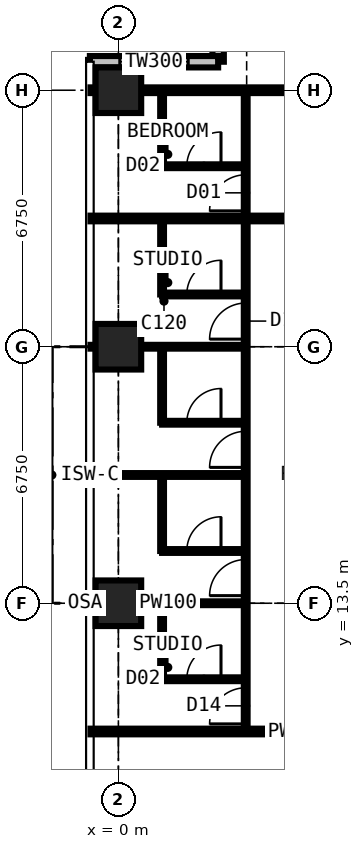
"""IFC4 building model, lengths in metres.
Left out: names, types, materials, properties, quantities, classifications, styles, units other than length and angle.
Written with IfcOpenShell. Run it as: python <this file> out.ifc"""

import sys

from ifc_helpers import new_model, si_unit, direction, frame, frame_2d, origin, origin_2d, place, context, subcontext, project, spatial, rectangle, extrude, element, fill, save


model = new_model("IFC4")
c1 = context("Model", 3, precision=1e-05, world=origin(), true_north=direction((0.0, 1.0)))
c2 = subcontext(c1, "Body", "Model", "MODEL_VIEW")
j1 = project(units=[si_unit("LENGTHUNIT", "METRE"), si_unit("PLANEANGLEUNIT", "RADIAN")], contexts=[c1])
p1 = place(None, origin())
s1 = spatial("IfcSite", under=j1, at=p1, CompositionType="ELEMENT")
p2 = place(p1, origin())
s2 = spatial("IfcBuilding", under=s1, at=p2, CompositionType="ELEMENT")
p3 = place(p2, frame((0.0, 0.0, 181.8)))
s3 = spatial("IfcBuildingStorey", under=s2, at=p3, CompositionType="ELEMENT", Elevation=181.8)
for number, where, z_axis, x_axis in (
    (1, (0.0, 13.5, 0.0), (0.0, 0.0, 1.0), (1.0, 0.0, 0.0)),
    (2, (0.0, 20.25, 0.0), (0.0, 0.0, 1.0), (1.0, 0.0, 0.0)),
    (3, (0.0, 27.0, 0.0), (0.0, 0.0, 1.0), (1.0, 0.0, 0.0)),
):
    element("IfcColumn", number, at=place(p3, frame(where, z_axis=z_axis, x_axis=x_axis)), inside=s3, PredefinedType="COLUMN", context=c2, shape_type="SweptSolid", body=[
        extrude(rectangle(XDim=1.2, YDim=1.2, at=origin_2d()), origin(), (0.0, 0.0, 1.0), 3.6),
    ])
p4 = place(p3, frame((2.625, 31.125, 0.0), z_axis=(0.0, 0.0, 1.0), x_axis=(0.0, -1.0, 0.0)))
e4 = element("IfcWall", 4, at=p4, inside=s3, PredefinedType="SOLIDWALL", context=c2, shape_type="SweptSolid", body=[
    extrude(rectangle(XDim=3.375, YDim=0.3, at=frame_2d((1.688, 0.0))), origin(), (0.0, 0.0, 1.0), 3.375),
])
p5 = place(p4, frame((0.788, 0.0, 0.6)))
e5 = element("IfcOpeningElement", 5, at=p5, cuts=e4, PredefinedType="OPENING", context=c2, shape_type="SweptSolid", body=[
    extrude(rectangle(XDim=1.8, YDim=2.1, at=frame_2d((0.9, 1.05))), frame((0.0, 0.16, 0.0), z_axis=(0.0, -1.0, 0.0), x_axis=(1.0, 0.0, 0.0)), (0.0, 0.0, 1.0), 0.32),
])
p6 = place(p3, frame((2.625, 27.75, 0.0), z_axis=(0.0, 0.0, 1.0), x_axis=(-1.0, 0.0, 0.0)))
e6 = element("IfcWall", 6, at=p6, inside=s3, PredefinedType="SOLIDWALL", context=c2, shape_type="SweptSolid", body=[
    extrude(rectangle(XDim=3.375, YDim=0.3, at=frame_2d((1.688, 0.0))), origin(), (0.0, 0.0, 1.0), 3.375),
])
p7 = place(p6, frame((0.788, 0.0, 0.6)))
e7 = element("IfcOpeningElement", 7, at=p7, cuts=e6, PredefinedType="OPENING", context=c2, shape_type="SweptSolid", body=[
    extrude(rectangle(XDim=1.8, YDim=2.1, at=frame_2d((0.9, 1.05))), frame((0.0, 0.16, 0.0), z_axis=(0.0, -1.0, 0.0), x_axis=(1.0, 0.0, 0.0)), (0.0, 0.0, 1.0), 0.32),
])
p8 = place(p3, frame((-0.734, 10.125, 0.0), z_axis=(0.0, 0.0, 1.0), x_axis=(1.0, 0.0, 0.0)))
e8 = element("IfcWall", 8, at=p8, inside=s3, PredefinedType="PARTITIONING", context=c2, shape_type="SweptSolid", body=[
    extrude(rectangle(XDim=10.859, YDim=0.15, at=frame_2d((5.429, 0.0))), origin(), (0.0, 0.0, 1.0), 3.375),
])
p9 = place(p8, frame((8.234, 0.0, 0.0)))
e9 = element("IfcOpeningElement", 9, at=p9, cuts=e8, PredefinedType="OPENING", context=c2, shape_type="SweptSolid", body=[
    extrude(rectangle(XDim=0.95, YDim=2.2, at=frame_2d((0.475, 1.1))), frame((0.0, 0.085, 0.0), z_axis=(0.0, -1.0, 0.0), x_axis=(1.0, 0.0, 0.0)), (0.0, 0.0, 1.0), 0.17),
])
p10 = place(p3, frame((-0.734, 13.5, 0.0), z_axis=(0.0, 0.0, 1.0), x_axis=(1.0, 0.0, 0.0)))
e10 = element("IfcWall", 10, at=p10, inside=s3, PredefinedType="PARTITIONING", context=c2, shape_type="SweptSolid", body=[
    extrude(rectangle(XDim=4.084, YDim=0.1, at=frame_2d((2.042, 0.0))), origin(), (0.0, 0.0, 1.0), 2.61),
])
p11 = place(p3, frame((-0.734, 16.875, 0.0), z_axis=(0.0, 0.0, 1.0), x_axis=(1.0, 0.0, 0.0)))
e11 = element("IfcWall", 11, at=p11, inside=s3, PredefinedType="PARTITIONING", context=c2, shape_type="SweptSolid", body=[
    extrude(rectangle(XDim=4.084, YDim=0.1, at=frame_2d((2.042, 0.0))), origin(), (0.0, 0.0, 1.0), 3.375),
])
p12 = place(p3, frame((-0.734, 20.25, 0.0), z_axis=(0.0, 0.0, 1.0), x_axis=(1.0, 0.0, 0.0)))
e12 = element("IfcWall", 12, at=p12, inside=s3, PredefinedType="PARTITIONING", context=c2, shape_type="SweptSolid", body=[
    extrude(rectangle(XDim=4.084, YDim=0.1, at=frame_2d((2.042, 0.0))), origin(), (0.0, 0.0, 1.0), 2.61),
])
p13 = place(p3, frame((-0.734, 23.625, 0.0), z_axis=(0.0, 0.0, 1.0), x_axis=(1.0, 0.0, 0.0)))
e13 = element("IfcWall", 13, at=p13, inside=s3, PredefinedType="PARTITIONING", context=c2, shape_type="SweptSolid", body=[
    extrude(rectangle(XDim=12.034, YDim=0.15, at=frame_2d((6.017, 0.0))), origin(), (0.0, 0.0, 1.0), 3.375),
])
p14 = place(p3, frame((-0.734, 27.0, 0.0), z_axis=(0.0, 0.0, 1.0), x_axis=(1.0, 0.0, 0.0)))
e14 = element("IfcWall", 14, at=p14, inside=s3, PredefinedType="PARTITIONING", context=c2, shape_type="SweptSolid", body=[
    extrude(rectangle(XDim=12.034, YDim=0.15, at=frame_2d((6.017, 0.0))), origin(), (0.0, 0.0, 1.0), 2.806),
])
p15 = place(p14, frame((8.134, 0.0, 0.0)))
e15 = element("IfcOpeningElement", 15, at=p15, cuts=e14, PredefinedType="OPENING", context=c2, shape_type="SweptSolid", body=[
    extrude(rectangle(XDim=1.0, YDim=2.2, at=frame_2d((0.5, 1.1))), frame((0.0, 0.085, 0.0), z_axis=(0.0, -1.0, 0.0), x_axis=(1.0, 0.0, 0.0)), (0.0, 0.0, 1.0), 0.17),
])
p16 = place(p3, frame((1.15, 11.5, 0.0), z_axis=(0.0, 0.0, 1.0), x_axis=(0.0, 1.0, 0.0)))
e16 = element("IfcWall", 16, at=p16, inside=s3, PredefinedType="PARTITIONING", context=c2, shape_type="SweptSolid", body=[
    extrude(rectangle(XDim=2.0, YDim=0.1, at=frame_2d((1.0, 0.0))), origin(), (0.0, 0.0, 1.0), 3.375),
])
p17 = place(p3, frame((1.15, 11.5, 0.0), z_axis=(0.0, 0.0, 1.0), x_axis=(1.0, 0.0, 0.0)))
e17 = element("IfcWall", 17, at=p17, inside=s3, PredefinedType="PARTITIONING", context=c2, shape_type="SweptSolid", body=[
    extrude(rectangle(XDim=2.2, YDim=0.1, at=frame_2d((1.1, 0.0))), origin(), (0.0, 0.0, 1.0), 3.375),
])
p18 = place(p17, frame((0.65, 0.0, 0.0)))
e18 = element("IfcOpeningElement", 18, at=p18, cuts=e17, PredefinedType="OPENING", context=c2, shape_type="SweptSolid", body=[
    extrude(rectangle(XDim=0.9, YDim=2.2, at=frame_2d((0.45, 1.1))), frame((0.0, 0.06, 0.0), z_axis=(0.0, -1.0, 0.0), x_axis=(1.0, 0.0, 0.0)), (0.0, 0.0, 1.0), 0.12),
])
p19 = place(p3, frame((1.15, 14.875, 0.0), z_axis=(0.0, 0.0, 1.0), x_axis=(0.0, 1.0, 0.0)))
e19 = element("IfcWall", 19, at=p19, inside=s3, PredefinedType="PARTITIONING", context=c2, shape_type="SweptSolid", body=[
    extrude(rectangle(XDim=2.0, YDim=0.1, at=frame_2d((1.0, 0.0))), origin(), (0.0, 0.0, 1.0), 3.375),
])
p20 = place(p3, frame((1.15, 14.875, 0.0), z_axis=(0.0, 0.0, 1.0), x_axis=(1.0, 0.0, 0.0)))
e20 = element("IfcWall", 20, at=p20, inside=s3, PredefinedType="PARTITIONING", context=c2, shape_type="SweptSolid", body=[
    extrude(rectangle(XDim=2.2, YDim=0.1, at=frame_2d((1.1, 0.0))), origin(), (0.0, 0.0, 1.0), 3.375),
])
p21 = place(p20, frame((0.65, 0.0, 0.0)))
e21 = element("IfcOpeningElement", 21, at=p21, cuts=e20, PredefinedType="OPENING", context=c2, shape_type="SweptSolid", body=[
    extrude(rectangle(XDim=0.9, YDim=2.2, at=frame_2d((0.45, 1.1))), frame((0.0, 0.06, 0.0), z_axis=(0.0, -1.0, 0.0), x_axis=(1.0, 0.0, 0.0)), (0.0, 0.0, 1.0), 0.12),
])
p22 = place(p3, frame((1.15, 18.25, 0.0), z_axis=(0.0, 0.0, 1.0), x_axis=(0.0, 1.0, 0.0)))
e22 = element("IfcWall", 22, at=p22, inside=s3, PredefinedType="PARTITIONING", context=c2, shape_type="SweptSolid", body=[
    extrude(rectangle(XDim=2.0, YDim=0.1, at=frame_2d((1.0, 0.0))), origin(), (0.0, 0.0, 1.0), 3.375),
])
p23 = place(p3, frame((1.15, 18.25, 0.0), z_axis=(0.0, 0.0, 1.0), x_axis=(1.0, 0.0, 0.0)))
e23 = element("IfcWall", 23, at=p23, inside=s3, PredefinedType="PARTITIONING", context=c2, shape_type="SweptSolid", body=[
    extrude(rectangle(XDim=2.2, YDim=0.1, at=frame_2d((1.1, 0.0))), origin(), (0.0, 0.0, 1.0), 3.375),
])
p24 = place(p23, frame((0.65, 0.0, 0.0)))
e24 = element("IfcOpeningElement", 24, at=p24, cuts=e23, PredefinedType="OPENING", context=c2, shape_type="SweptSolid", body=[
    extrude(rectangle(XDim=0.9, YDim=2.2, at=frame_2d((0.45, 1.1))), frame((0.0, 0.06, 0.0), z_axis=(0.0, -1.0, 0.0), x_axis=(1.0, 0.0, 0.0)), (0.0, 0.0, 1.0), 0.12),
])
p25 = place(p3, frame((1.15, 21.625, 0.0), z_axis=(0.0, 0.0, 1.0), x_axis=(0.0, 1.0, 0.0)))
e25 = element("IfcWall", 25, at=p25, inside=s3, PredefinedType="PARTITIONING", context=c2, shape_type="SweptSolid", body=[
    extrude(rectangle(XDim=2.0, YDim=0.1, at=frame_2d((1.0, 0.0))), origin(), (0.0, 0.0, 1.0), 3.375),
])
p26 = place(p3, frame((1.15, 21.625, 0.0), z_axis=(0.0, 0.0, 1.0), x_axis=(1.0, 0.0, 0.0)))
e26 = element("IfcWall", 26, at=p26, inside=s3, PredefinedType="PARTITIONING", context=c2, shape_type="SweptSolid", body=[
    extrude(rectangle(XDim=2.2, YDim=0.1, at=frame_2d((1.1, 0.0))), origin(), (0.0, 0.0, 1.0), 3.375),
])
p27 = place(p26, frame((0.65, 0.0, 0.0)))
e27 = element("IfcOpeningElement", 27, at=p27, cuts=e26, PredefinedType="OPENING", context=c2, shape_type="SweptSolid", body=[
    extrude(rectangle(XDim=0.9, YDim=2.2, at=frame_2d((0.45, 1.1))), frame((0.0, 0.06, 0.0), z_axis=(0.0, -1.0, 0.0), x_axis=(1.0, 0.0, 0.0)), (0.0, 0.0, 1.0), 0.12),
])
p28 = place(p3, frame((1.15, 25.0, 0.0), z_axis=(0.0, 0.0, 1.0), x_axis=(0.0, 1.0, 0.0)))
e28 = element("IfcWall", 28, at=p28, inside=s3, PredefinedType="PARTITIONING", context=c2, shape_type="SweptSolid", body=[
    extrude(rectangle(XDim=2.0, YDim=0.1, at=frame_2d((1.0, 0.0))), origin(), (0.0, 0.0, 1.0), 3.375),
])
p29 = place(p3, frame((1.15, 25.0, 0.0), z_axis=(0.0, 0.0, 1.0), x_axis=(1.0, 0.0, 0.0)))
e29 = element("IfcWall", 29, at=p29, inside=s3, PredefinedType="PARTITIONING", context=c2, shape_type="SweptSolid", body=[
    extrude(rectangle(XDim=2.2, YDim=0.1, at=frame_2d((1.1, 0.0))), origin(), (0.0, 0.0, 1.0), 3.375),
])
p30 = place(p29, frame((0.65, 0.0, 0.0)))
e30 = element("IfcOpeningElement", 30, at=p30, cuts=e29, PredefinedType="OPENING", context=c2, shape_type="SweptSolid", body=[
    extrude(rectangle(XDim=0.9, YDim=2.2, at=frame_2d((0.45, 1.1))), frame((0.0, 0.06, 0.0), z_axis=(0.0, -1.0, 0.0), x_axis=(1.0, 0.0, 0.0)), (0.0, 0.0, 1.0), 0.12),
])
p31 = place(p3, frame((3.35, 10.125, 0.0), z_axis=(0.0, 0.0, 1.0), x_axis=(0.0, 1.0, 0.0)))
e31 = element("IfcWall", 31, at=p31, inside=s3, PredefinedType="PARTITIONING", context=c2, shape_type="SweptSolid", body=[
    extrude(rectangle(XDim=16.875, YDim=0.1, at=frame_2d((8.438, 0.0))), origin(), (0.0, 0.0, 1.0), 3.375),
])
p32 = place(p31, frame((13.7, 0.0, 0.0)))
e32 = element("IfcOpeningElement", 32, at=p32, cuts=e31, PredefinedType="OPENING", context=c2, shape_type="SweptSolid", body=[
    extrude(rectangle(XDim=0.95, YDim=2.2, at=frame_2d((0.475, 1.1))), frame((0.0, 0.06, 0.0), z_axis=(0.0, -1.0, 0.0), x_axis=(1.0, 0.0, 0.0)), (0.0, 0.0, 1.0), 0.12),
])
p33 = place(p31, frame((0.2, 0.0, 0.0)))
e33 = element("IfcOpeningElement", 33, at=p33, cuts=e31, PredefinedType="OPENING", context=c2, shape_type="SweptSolid", body=[
    extrude(rectangle(XDim=0.95, YDim=2.2, at=frame_2d((0.475, 1.1))), frame((0.0, 0.06, 0.0), z_axis=(0.0, -1.0, 0.0), x_axis=(1.0, 0.0, 0.0)), (0.0, 0.0, 1.0), 0.12),
])
p34 = place(p31, frame((3.575, 0.0, 0.0)))
e34 = element("IfcOpeningElement", 34, at=p34, cuts=e31, PredefinedType="OPENING", context=c2, shape_type="SweptSolid", body=[
    extrude(rectangle(XDim=0.95, YDim=2.2, at=frame_2d((0.475, 1.1))), frame((0.0, 0.06, 0.0), z_axis=(0.0, -1.0, 0.0), x_axis=(1.0, 0.0, 0.0)), (0.0, 0.0, 1.0), 0.12),
])
p35 = place(p31, frame((6.95, 0.0, 0.0)))
e35 = element("IfcOpeningElement", 35, at=p35, cuts=e31, PredefinedType="OPENING", context=c2, shape_type="SweptSolid", body=[
    extrude(rectangle(XDim=0.95, YDim=2.2, at=frame_2d((0.475, 1.1))), frame((0.0, 0.06, 0.0), z_axis=(0.0, -1.0, 0.0), x_axis=(1.0, 0.0, 0.0)), (0.0, 0.0, 1.0), 0.12),
])
p36 = place(p31, frame((10.325, 0.0, 0.0)))
e36 = element("IfcOpeningElement", 36, at=p36, cuts=e31, PredefinedType="OPENING", context=c2, shape_type="SweptSolid", body=[
    extrude(rectangle(XDim=0.95, YDim=2.2, at=frame_2d((0.475, 1.1))), frame((0.0, 0.06, 0.0), z_axis=(0.0, -1.0, 0.0), x_axis=(1.0, 0.0, 0.0)), (0.0, 0.0, 1.0), 0.12),
])
p37 = place(p7, origin())
e37 = element("IfcWindow", 37, at=p37, inside=s3, PartitioningType="SINGLE_PANEL", PredefinedType="WINDOW", context=c2, shape_type="SweptSolid", body=[
    extrude(rectangle(XDim=1.8, YDim=2.1, at=frame_2d((0.9, 1.05))), frame((0.0, 0.03, 0.0), z_axis=(0.0, -1.0, 0.0), x_axis=(1.0, 0.0, 0.0)), (0.0, 0.0, 1.0), 0.06),
])
fill(e7, e37)
p38 = place(p32, origin())
e38 = element("IfcDoor", 38, at=p38, inside=s3, OperationType="SINGLE_SWING_LEFT", PredefinedType="DOOR", context=c2, shape_type="SweptSolid", body=[
    extrude(rectangle(XDim=0.95, YDim=2.2, at=frame_2d((0.475, 1.1))), frame((0.0, 0.025, 0.0), z_axis=(0.0, -1.0, 0.0), x_axis=(1.0, 0.0, 0.0)), (0.0, 0.0, 1.0), 0.05),
])
fill(e32, e38)
p39 = place(p30, origin())
e39 = element("IfcDoor", 39, at=p39, inside=s3, OperationType="SINGLE_SWING_RIGHT", PredefinedType="DOOR", context=c2, shape_type="SweptSolid", body=[
    extrude(rectangle(XDim=0.9, YDim=2.2, at=frame_2d((0.45, 1.1))), frame((0.0, 0.025, 0.0), z_axis=(0.0, -1.0, 0.0), x_axis=(1.0, 0.0, 0.0)), (0.0, 0.0, 1.0), 0.05),
])
fill(e30, e39)
p40 = place(p33, origin())
e40 = element("IfcDoor", 40, at=p40, inside=s3, OperationType="SINGLE_SWING_LEFT", PredefinedType="DOOR", context=c2, shape_type="SweptSolid", body=[
    extrude(rectangle(XDim=0.95, YDim=2.2, at=frame_2d((0.475, 1.1))), frame((0.0, 0.025, 0.0), z_axis=(0.0, -1.0, 0.0), x_axis=(1.0, 0.0, 0.0)), (0.0, 0.0, 1.0), 0.05),
])
fill(e33, e40)
p41 = place(p18, origin())
e41 = element("IfcDoor", 41, at=p41, inside=s3, OperationType="SINGLE_SWING_RIGHT", PredefinedType="DOOR", context=c2, shape_type="SweptSolid", body=[
    extrude(rectangle(XDim=0.9, YDim=2.2, at=frame_2d((0.45, 1.1))), frame((0.0, 0.025, 0.0), z_axis=(0.0, -1.0, 0.0), x_axis=(1.0, 0.0, 0.0)), (0.0, 0.0, 1.0), 0.05),
])
fill(e18, e41)
p42 = place(p34, origin())
e42 = element("IfcDoor", 42, at=p42, inside=s3, OperationType="SINGLE_SWING_LEFT", PredefinedType="DOOR", context=c2, shape_type="SweptSolid", body=[
    extrude(rectangle(XDim=0.95, YDim=2.2, at=frame_2d((0.475, 1.1))), frame((0.0, 0.025, 0.0), z_axis=(0.0, -1.0, 0.0), x_axis=(1.0, 0.0, 0.0)), (0.0, 0.0, 1.0), 0.05),
])
fill(e34, e42)
p43 = place(p21, origin())
e43 = element("IfcDoor", 43, at=p43, inside=s3, OperationType="SINGLE_SWING_RIGHT", PredefinedType="DOOR", context=c2, shape_type="SweptSolid", body=[
    extrude(rectangle(XDim=0.9, YDim=2.2, at=frame_2d((0.45, 1.1))), frame((0.0, 0.025, 0.0), z_axis=(0.0, -1.0, 0.0), x_axis=(1.0, 0.0, 0.0)), (0.0, 0.0, 1.0), 0.05),
])
fill(e21, e43)
p44 = place(p35, origin())
e44 = element("IfcDoor", 44, at=p44, inside=s3, OperationType="SINGLE_SWING_LEFT", PredefinedType="DOOR", context=c2, shape_type="SweptSolid", body=[
    extrude(rectangle(XDim=0.95, YDim=2.2, at=frame_2d((0.475, 1.1))), frame((0.0, 0.025, 0.0), z_axis=(0.0, -1.0, 0.0), x_axis=(1.0, 0.0, 0.0)), (0.0, 0.0, 1.0), 0.05),
])
fill(e35, e44)
p45 = place(p24, origin())
e45 = element("IfcDoor", 45, at=p45, inside=s3, OperationType="SINGLE_SWING_RIGHT", PredefinedType="DOOR", context=c2, shape_type="SweptSolid", body=[
    extrude(rectangle(XDim=0.9, YDim=2.2, at=frame_2d((0.45, 1.1))), frame((0.0, 0.025, 0.0), z_axis=(0.0, -1.0, 0.0), x_axis=(1.0, 0.0, 0.0)), (0.0, 0.0, 1.0), 0.05),
])
fill(e24, e45)
p46 = place(p36, origin())
e46 = element("IfcDoor", 46, at=p46, inside=s3, OperationType="SINGLE_SWING_LEFT", PredefinedType="DOOR", context=c2, shape_type="SweptSolid", body=[
    extrude(rectangle(XDim=0.95, YDim=2.2, at=frame_2d((0.475, 1.1))), frame((0.0, 0.025, 0.0), z_axis=(0.0, -1.0, 0.0), x_axis=(1.0, 0.0, 0.0)), (0.0, 0.0, 1.0), 0.05),
])
fill(e36, e46)
p47 = place(p27, origin())
e47 = element("IfcDoor", 47, at=p47, inside=s3, OperationType="SINGLE_SWING_RIGHT", PredefinedType="DOOR", context=c2, shape_type="SweptSolid", body=[
    extrude(rectangle(XDim=0.9, YDim=2.2, at=frame_2d((0.45, 1.1))), frame((0.0, 0.025, 0.0), z_axis=(0.0, -1.0, 0.0), x_axis=(1.0, 0.0, 0.0)), (0.0, 0.0, 1.0), 0.05),
])
fill(e27, e47)
save(model, sys.argv[1])
